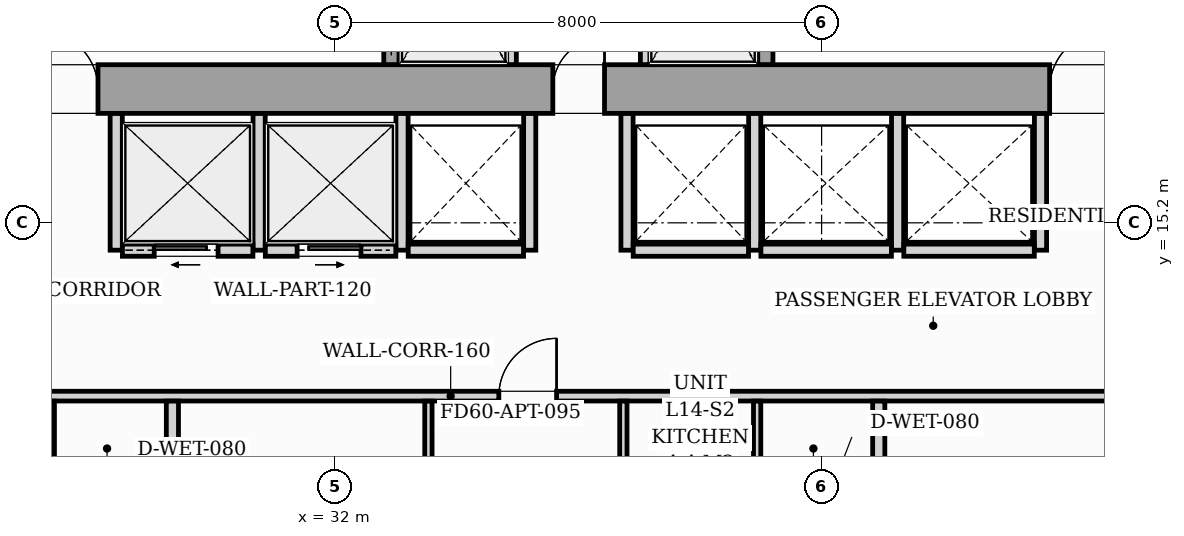
"""IFC4 building model, lengths in metres.
Left out: names, types, materials, properties, quantities, classifications, styles, units other than length and angle.
Written with IfcOpenShell. Run it as: python <this file> out.ifc"""

import sys

from ifc_helpers import new_model, si_unit, direction, frame, frame_2d, origin, origin_2d, place, context, subcontext, project, spatial, rectangle, i_section, extrude, source, transform, mapped, element, fill, save


model = new_model("IFC4")
c1 = context("Model", 3, precision=1e-05, world=origin(), true_north=direction((0.0, 1.0)))
c2 = subcontext(c1, "Body", "Model", "MODEL_VIEW")
j1 = project(units=[si_unit("LENGTHUNIT", "METRE"), si_unit("PLANEANGLEUNIT", "RADIAN")], contexts=[c1])
p1 = place(None, origin())
s1 = spatial("IfcSite", under=j1, at=p1, CompositionType="ELEMENT")
p2 = place(p1, origin())
s2 = spatial("IfcBuilding", under=s1, at=p2, CompositionType="ELEMENT")
p3 = place(p2, frame((0.0, 0.0, 51.8)))
s3 = spatial("IfcBuildingStorey", under=s2, at=p3, CompositionType="ELEMENT", Elevation=51.8)
m1 = source(origin(), c2, "Body", "SweptSolid", [
    extrude(i_section(OverallWidth=0.437, OverallDepth=0.514, WebThickness=0.061, FlangeThickness=0.097, FilletRadius=0.018, at=origin_2d()), origin(), (0.0, 0.0, 1.0), 3.196),
])
for number, where, z_axis, x_axis in (
    (1, (33.12, 17.4, 0.002), (0.0, 0.0, 1.0), (1.0, 0.0, 0.0)),
    (2, (38.88, 17.4, 0.002), (0.0, 0.0, 1.0), (1.0, 0.0, 0.0)),
):
    element("IfcColumn", number, at=place(p3, frame(where, z_axis=z_axis, x_axis=x_axis)), inside=s3, PredefinedType="PILASTER", context=c2, shape_type="MappedRepresentation", body=[
        mapped(m1, transform((0.0, 0.0, 0.0), scale=1.0)),
    ])
p4 = place(p3, frame((26.0, 17.4, 0.0), z_axis=(0.0, 0.0, 1.0), x_axis=(1.0, 0.0, 0.0)))
e3 = element("IfcWall", 3, at=p4, inside=s3, PredefinedType="SHEAR", context=c2, shape_type="SweptSolid", body=[
    extrude(rectangle(XDim=20.0, YDim=0.8, at=frame_2d((10.0, 0.0))), origin(), (0.0, 0.0, 1.0), 3.2),
])
p5 = place(p4, frame((1.15, 0.0, 0.0)))
e4 = element("IfcOpeningElement", 4, at=p5, cuts=e3, PredefinedType="OPENING", context=c2, shape_type="SweptSolid", body=[
    extrude(rectangle(XDim=0.95, YDim=2.06, at=frame_2d((0.475, 1.03))), frame((0.0, 0.41, 0.0), z_axis=(0.0, -1.0, 0.0), x_axis=(1.0, 0.0, 0.0)), (0.0, 0.0, 1.0), 0.82),
])
p6 = place(p4, frame((9.58, 0.0, 0.0)))
e5 = element("IfcOpeningElement", 5, at=p6, cuts=e3, PredefinedType="OPENING", context=c2, shape_type="SweptSolid", body=[
    extrude(rectangle(XDim=0.85, YDim=2.0, at=frame_2d((0.425, 1.0))), frame((0.0, 0.41, 0.0), z_axis=(0.0, -1.0, 0.0), x_axis=(1.0, 0.0, 0.0)), (0.0, 0.0, 1.0), 0.82),
])
p7 = place(p4, frame((17.75, 0.0, 0.0)))
e6 = element("IfcOpeningElement", 6, at=p7, cuts=e3, PredefinedType="OPENING", context=c2, shape_type="SweptSolid", body=[
    extrude(rectangle(XDim=0.95, YDim=2.06, at=frame_2d((0.475, 1.03))), frame((0.0, 0.41, 0.0), z_axis=(0.0, -1.0, 0.0), x_axis=(1.0, 0.0, 0.0)), (0.0, 0.0, 1.0), 0.82),
])
p8 = place(p3, frame((32.925, 17.802, 0.0), z_axis=(0.0, 0.0, 1.0), x_axis=(0.0, 1.0, 0.0)))
e7 = element("IfcWall", 7, at=p8, inside=s3, PredefinedType="SOLIDWALL", context=c2, shape_type="SweptSolid", body=[
    extrude(rectangle(XDim=2.646, YDim=0.25, at=frame_2d((1.323, 0.0))), origin(), (0.0, 0.0, 1.0), 3.2),
])
p9 = place(p8, frame((0.648, 0.0, 0.0)))
e8 = element("IfcOpeningElement", 8, at=p9, cuts=e7, PredefinedType="OPENING", context=c2, shape_type="SweptSolid", body=[
    extrude(rectangle(XDim=1.1, YDim=2.08, at=frame_2d((0.55, 1.04))), frame((0.0, 0.135, 0.0), z_axis=(0.0, -1.0, 0.0), x_axis=(1.0, 0.0, 0.0)), (0.0, 0.0, 1.0), 0.27),
])
for number, where, z_axis, x_axis in (
    (9, (34.9, 17.802, 0.0), (0.0, 0.0, 1.0), (0.0, 1.0, 0.0)),
    (10, (37.1, 17.802, 0.0), (0.0, 0.0, 1.0), (0.0, 1.0, 0.0)),
):
    element("IfcWall", number, at=place(p3, frame(where, z_axis=z_axis, x_axis=x_axis)), inside=s3, PredefinedType="PARTITIONING", context=c2, shape_type="SweptSolid", body=[
        extrude(rectangle(XDim=2.646, YDim=0.16, at=frame_2d((1.323, 0.0))), origin(), (0.0, 0.0, 1.0), 2.94),
    ])
p10 = place(p3, frame((39.075, 17.802, 0.0), z_axis=(0.0, 0.0, 1.0), x_axis=(0.0, 1.0, 0.0)))
e11 = element("IfcWall", 11, at=p10, inside=s3, PredefinedType="SOLIDWALL", context=c2, shape_type="SweptSolid", body=[
    extrude(rectangle(XDim=2.646, YDim=0.25, at=frame_2d((1.323, 0.0))), origin(), (0.0, 0.0, 1.0), 3.2),
])
p11 = place(p10, frame((0.648, 0.0, 0.0)))
e12 = element("IfcOpeningElement", 12, at=p11, cuts=e11, PredefinedType="OPENING", context=c2, shape_type="SweptSolid", body=[
    extrude(rectangle(XDim=1.1, YDim=2.08, at=frame_2d((0.55, 1.04))), frame((0.0, 0.135, 0.0), z_axis=(0.0, -1.0, 0.0), x_axis=(1.0, 0.0, 0.0)), (0.0, 0.0, 1.0), 0.27),
])
for number, where, z_axis, x_axis in (
    (13, (28.4, 14.75, 0.0), (0.0, 0.0, 1.0), (0.0, 1.0, 0.0)),
    (14, (30.75, 14.75, 0.0), (0.0, 0.0, 1.0), (0.0, 1.0, 0.0)),
    (15, (33.1, 14.75, 0.0), (0.0, 0.0, 1.0), (0.0, 1.0, 0.0)),
):
    element("IfcWall", number, at=place(p3, frame(where, z_axis=z_axis, x_axis=x_axis)), inside=s3, PredefinedType="PARTITIONING", context=c2, shape_type="SweptSolid", body=[
        extrude(rectangle(XDim=2.248, YDim=0.2, at=frame_2d((1.124, 0.0))), origin(), (0.0, 0.0, 1.0), 2.94),
    ])
p12 = place(p3, frame((28.502, 14.75, 0.0), z_axis=(0.0, 0.0, 1.0), x_axis=(1.0, 0.0, 0.0)))
e16 = element("IfcWall", 16, at=p12, inside=s3, PredefinedType="PARTITIONING", context=c2, shape_type="SweptSolid", body=[
    extrude(rectangle(XDim=2.146, YDim=0.2, at=frame_2d((1.073, 0.0))), origin(), (0.0, 0.0, 1.0), 2.94),
])
p13 = place(p12, frame((0.523, 0.0, 0.0)))
e17 = element("IfcOpeningElement", 17, at=p13, cuts=e16, PredefinedType="OPENING", context=c2, shape_type="SweptSolid", body=[
    extrude(rectangle(XDim=1.05, YDim=2.08, at=frame_2d((0.525, 1.04))), frame((0.0, 0.11, 0.0), z_axis=(0.0, -1.0, 0.0), x_axis=(1.0, 0.0, 0.0)), (0.0, 0.0, 1.0), 0.22),
])
p14 = place(p3, frame((30.852, 14.75, 0.0), z_axis=(0.0, 0.0, 1.0), x_axis=(1.0, 0.0, 0.0)))
e18 = element("IfcWall", 18, at=p14, inside=s3, PredefinedType="PARTITIONING", context=c2, shape_type="SweptSolid", body=[
    extrude(rectangle(XDim=2.146, YDim=0.2, at=frame_2d((1.073, 0.0))), origin(), (0.0, 0.0, 1.0), 2.94),
])
p15 = place(p14, frame((0.523, 0.0, 0.0)))
e19 = element("IfcOpeningElement", 19, at=p15, cuts=e18, PredefinedType="OPENING", context=c2, shape_type="SweptSolid", body=[
    extrude(rectangle(XDim=1.05, YDim=2.08, at=frame_2d((0.525, 1.04))), frame((0.0, 0.11, 0.0), z_axis=(0.0, -1.0, 0.0), x_axis=(1.0, 0.0, 0.0)), (0.0, 0.0, 1.0), 0.22),
])
p16 = place(p3, frame((35.2, 14.75, 0.0), z_axis=(0.0, 0.0, 1.0), x_axis=(0.0, 1.0, 0.0)))
e20 = element("IfcWall", 20, at=p16, inside=s3, PredefinedType="PARTITIONING", context=c2, shape_type="SweptSolid", body=[
    extrude(rectangle(XDim=2.248, YDim=0.2, at=frame_2d((1.124, 0.0))), origin(), (0.0, 0.0, 1.0), 2.94),
])
p17 = place(p3, frame((33.202, 14.75, 0.0), z_axis=(0.0, 0.0, 1.0), x_axis=(1.0, 0.0, 0.0)))
e21 = element("IfcWall", 21, at=p17, inside=s3, PredefinedType="PARTITIONING", context=c2, shape_type="SweptSolid", body=[
    extrude(rectangle(XDim=1.896, YDim=0.2, at=frame_2d((0.948, 0.0))), origin(), (0.0, 0.0, 1.0), 2.94),
])
for number, where, z_axis, x_axis in (
    (22, (36.8, 14.75, 0.0), (0.0, 0.0, 1.0), (0.0, 1.0, 0.0)),
    (23, (38.9, 14.75, 0.0), (0.0, 0.0, 1.0), (0.0, 1.0, 0.0)),
):
    element("IfcWall", number, at=place(p3, frame(where, z_axis=z_axis, x_axis=x_axis)), inside=s3, PredefinedType="PARTITIONING", context=c2, shape_type="SweptSolid", body=[
        extrude(rectangle(XDim=2.248, YDim=0.2, at=frame_2d((1.124, 0.0))), origin(), (0.0, 0.0, 1.0), 2.94),
    ])
p18 = place(p3, frame((36.902, 14.75, 0.0), z_axis=(0.0, 0.0, 1.0), x_axis=(1.0, 0.0, 0.0)))
e24 = element("IfcWall", 24, at=p18, inside=s3, PredefinedType="PARTITIONING", context=c2, shape_type="SweptSolid", body=[
    extrude(rectangle(XDim=1.896, YDim=0.2, at=frame_2d((0.948, 0.0))), origin(), (0.0, 0.0, 1.0), 2.94),
])
for number, where, z_axis, x_axis in (
    (25, (41.25, 14.75, 0.0), (0.0, 0.0, 1.0), (0.0, 1.0, 0.0)),
    (26, (43.6, 14.75, 0.0), (0.0, 0.0, 1.0), (0.0, 1.0, 0.0)),
):
    element("IfcWall", number, at=place(p3, frame(where, z_axis=z_axis, x_axis=x_axis)), inside=s3, PredefinedType="PARTITIONING", context=c2, shape_type="SweptSolid", body=[
        extrude(rectangle(XDim=2.248, YDim=0.2, at=frame_2d((1.124, 0.0))), origin(), (0.0, 0.0, 1.0), 2.94),
    ])
for number, where, z_axis, x_axis in (
    (27, (39.002, 14.75, 0.0), (0.0, 0.0, 1.0), (1.0, 0.0, 0.0)),
    (28, (41.352, 14.75, 0.0), (0.0, 0.0, 1.0), (1.0, 0.0, 0.0)),
):
    element("IfcWall", number, at=place(p3, frame(where, z_axis=z_axis, x_axis=x_axis)), inside=s3, PredefinedType="PARTITIONING", context=c2, shape_type="SweptSolid", body=[
        extrude(rectangle(XDim=2.146, YDim=0.2, at=frame_2d((1.073, 0.0))), origin(), (0.0, 0.0, 1.0), 2.94),
    ])
p19 = place(p3, frame((16.3, 12.35, 0.0), z_axis=(0.0, 0.0, 1.0), x_axis=(1.0, 0.0, 0.0)))
e29 = element("IfcWall", 29, at=p19, inside=s3, PredefinedType="PARTITIONING", context=c2, shape_type="SweptSolid", body=[
    extrude(rectangle(XDim=35.2, YDim=0.16, at=frame_2d((17.6, 0.0))), origin(), (0.0, 0.0, 1.0), 2.94),
])
p20 = place(p19, frame((6.307, 0.0, 0.0)))
e30 = element("IfcOpeningElement", 30, at=p20, cuts=e29, PredefinedType="OPENING", context=c2, shape_type="SweptSolid", body=[
    extrude(rectangle(XDim=0.95, YDim=2.06, at=frame_2d((0.475, 1.03))), frame((0.0, 0.09, 0.0), z_axis=(0.0, -1.0, 0.0), x_axis=(1.0, 0.0, 0.0)), (0.0, 0.0, 1.0), 0.18),
])
p21 = place(p19, frame((18.392, 0.0, 0.0)))
e31 = element("IfcOpeningElement", 31, at=p21, cuts=e29, PredefinedType="OPENING", context=c2, shape_type="SweptSolid", body=[
    extrude(rectangle(XDim=0.95, YDim=2.06, at=frame_2d((0.475, 1.03))), frame((0.0, 0.09, 0.0), z_axis=(0.0, -1.0, 0.0), x_axis=(1.0, 0.0, 0.0)), (0.0, 0.0, 1.0), 0.18),
])
p22 = place(p19, frame((29.304, 0.0, 0.0)))
e32 = element("IfcOpeningElement", 32, at=p22, cuts=e29, PredefinedType="OPENING", context=c2, shape_type="SweptSolid", body=[
    extrude(rectangle(XDim=0.95, YDim=2.06, at=frame_2d((0.475, 1.03))), frame((0.0, 0.09, 0.0), z_axis=(0.0, -1.0, 0.0), x_axis=(1.0, 0.0, 0.0)), (0.0, 0.0, 1.0), 0.18),
])
p23 = place(p3, frame((27.324, 10.162, 0.0), z_axis=(0.0, 0.0, 1.0), x_axis=(0.0, 1.0, 0.0)))
e33 = element("IfcWall", 33, at=p23, inside=s3, PredefinedType="PARTITIONING", context=c2, shape_type="SweptSolid", body=[
    extrude(rectangle(XDim=2.106, YDim=0.12, at=frame_2d((1.053, 0.0))), origin(), (0.0, 0.0, 1.0), 2.94),
])
p24 = place(p3, frame((29.324, 10.162, 0.0), z_axis=(0.0, 0.0, 1.0), x_axis=(0.0, 1.0, 0.0)))
e34 = element("IfcWall", 34, at=p24, inside=s3, PredefinedType="PARTITIONING", context=c2, shape_type="SweptSolid", body=[
    extrude(rectangle(XDim=2.106, YDim=0.2, at=frame_2d((1.053, 0.0))), origin(), (0.0, 0.0, 1.0), 2.94),
])
for number, where, z_axis, x_axis in (
    (35, (36.74, 10.162, 0.0), (0.0, 0.0, 1.0), (0.0, 1.0, 0.0)),
    (36, (38.94, 10.162, 0.0), (0.0, 0.0, 1.0), (0.0, 1.0, 0.0)),
):
    element("IfcWall", number, at=place(p3, frame(where, z_axis=z_axis, x_axis=x_axis)), inside=s3, PredefinedType="PARTITIONING", context=c2, shape_type="SweptSolid", body=[
        extrude(rectangle(XDim=2.106, YDim=0.12, at=frame_2d((1.053, 0.0))), origin(), (0.0, 0.0, 1.0), 2.94),
    ])
p25 = place(p3, frame((33.534, 2.78, 0.0), z_axis=(0.0, 0.0, 1.0), x_axis=(0.0, 1.0, 0.0)))
e37 = element("IfcWall", 37, at=p25, inside=s3, PredefinedType="PARTITIONING", context=c2, shape_type="SweptSolid", body=[
    extrude(rectangle(XDim=9.488, YDim=0.12, at=frame_2d((4.744, 0.0))), origin(), (0.0, 0.0, 1.0), 2.94),
])
p26 = place(p25, frame((4.4, 0.0, 0.0)))
e38 = element("IfcOpeningElement", 38, at=p26, cuts=e37, PredefinedType="OPENING", context=c2, shape_type="SweptSolid", body=[
    extrude(rectangle(XDim=0.85, YDim=2.05, at=frame_2d((0.425, 1.025))), frame((0.0, 0.07, 0.0), z_axis=(0.0, -1.0, 0.0), x_axis=(1.0, 0.0, 0.0)), (0.0, 0.0, 1.0), 0.14),
])
p27 = place(p3, frame((40.94, 10.162, 0.0), z_axis=(0.0, 0.0, 1.0), x_axis=(0.0, 1.0, 0.0)))
e39 = element("IfcWall", 39, at=p27, inside=s3, PredefinedType="PARTITIONING", context=c2, shape_type="SweptSolid", body=[
    extrude(rectangle(XDim=2.106, YDim=0.2, at=frame_2d((1.053, 0.0))), origin(), (0.0, 0.0, 1.0), 2.94),
])
m2 = source(origin(), c2, "Body", "SweptSolid", [
    extrude(rectangle(XDim=0.95, YDim=2.06, at=frame_2d((0.475, 1.03))), frame((0.0, 0.025, 0.0), z_axis=(0.0, -1.0, 0.0), x_axis=(1.0, 0.0, 0.0)), (0.0, 0.0, 1.0), 0.05),
])
p28 = place(p5, origin())
e40 = element("IfcDoor", 40, at=p28, inside=s3, OperationType="SINGLE_SWING_LEFT", PredefinedType="DOOR", context=c2, shape_type="MappedRepresentation", body=[
    mapped(m2, transform((0.0, 0.0, 0.0), scale=1.0)),
])
fill(e4, e40)
m3 = source(origin(), c2, "Body", "SweptSolid", [
    extrude(rectangle(XDim=0.85, YDim=2.0, at=frame_2d((0.425, 1.0))), frame((0.0, 0.025, 0.0), z_axis=(0.0, -1.0, 0.0), x_axis=(1.0, 0.0, 0.0)), (0.0, 0.0, 1.0), 0.05),
])
p29 = place(p6, origin())
e41 = element("IfcDoor", 41, at=p29, inside=s3, OperationType="SINGLE_SWING_RIGHT", PredefinedType="DOOR", context=c2, shape_type="MappedRepresentation", body=[
    mapped(m3, transform((0.0, 0.0, 0.0), scale=1.0)),
])
fill(e5, e41)
p30 = place(p7, origin())
e42 = element("IfcDoor", 42, at=p30, inside=s3, OperationType="SINGLE_SWING_RIGHT", PredefinedType="DOOR", context=c2, shape_type="MappedRepresentation", body=[
    mapped(m2, transform((0.0, 0.0, 0.0), scale=1.0)),
])
fill(e6, e42)
m4 = source(origin(), c2, "Body", "SweptSolid", [
    extrude(rectangle(XDim=1.05, YDim=2.08, at=frame_2d((0.525, 1.04))), frame((0.0, 0.025, 0.0), z_axis=(0.0, -1.0, 0.0), x_axis=(1.0, 0.0, 0.0)), (0.0, 0.0, 1.0), 0.05),
])
p31 = place(p13, origin())
e43 = element("IfcDoor", 43, at=p31, inside=s3, OperationType="SLIDING_TO_LEFT", PredefinedType="DOOR", context=c2, shape_type="MappedRepresentation", body=[
    mapped(m4, transform((0.0, 0.0, 0.0), scale=1.0)),
])
fill(e17, e43)
p32 = place(p15, origin())
e44 = element("IfcDoor", 44, at=p32, inside=s3, OperationType="SLIDING_TO_RIGHT", PredefinedType="DOOR", context=c2, shape_type="MappedRepresentation", body=[
    mapped(m4, transform((0.0, 0.0, 0.0), scale=1.0)),
])
fill(e19, e44)
m5 = source(origin(), c2, "Body", "SweptSolid", [
    extrude(rectangle(XDim=0.95, YDim=2.06, at=frame_2d((0.475, 1.03))), frame((0.0, 0.025, 0.0), z_axis=(0.0, -1.0, 0.0), x_axis=(1.0, 0.0, 0.0)), (0.0, 0.0, 1.0), 0.05),
])
p33 = place(p21, origin())
e45 = element("IfcDoor", 45, at=p33, inside=s3, OperationType="SINGLE_SWING_RIGHT", PredefinedType="DOOR", context=c2, shape_type="MappedRepresentation", body=[
    mapped(m5, transform((0.0, 0.0, 0.0), scale=1.0)),
])
fill(e31, e45)
save(model, sys.argv[1])
